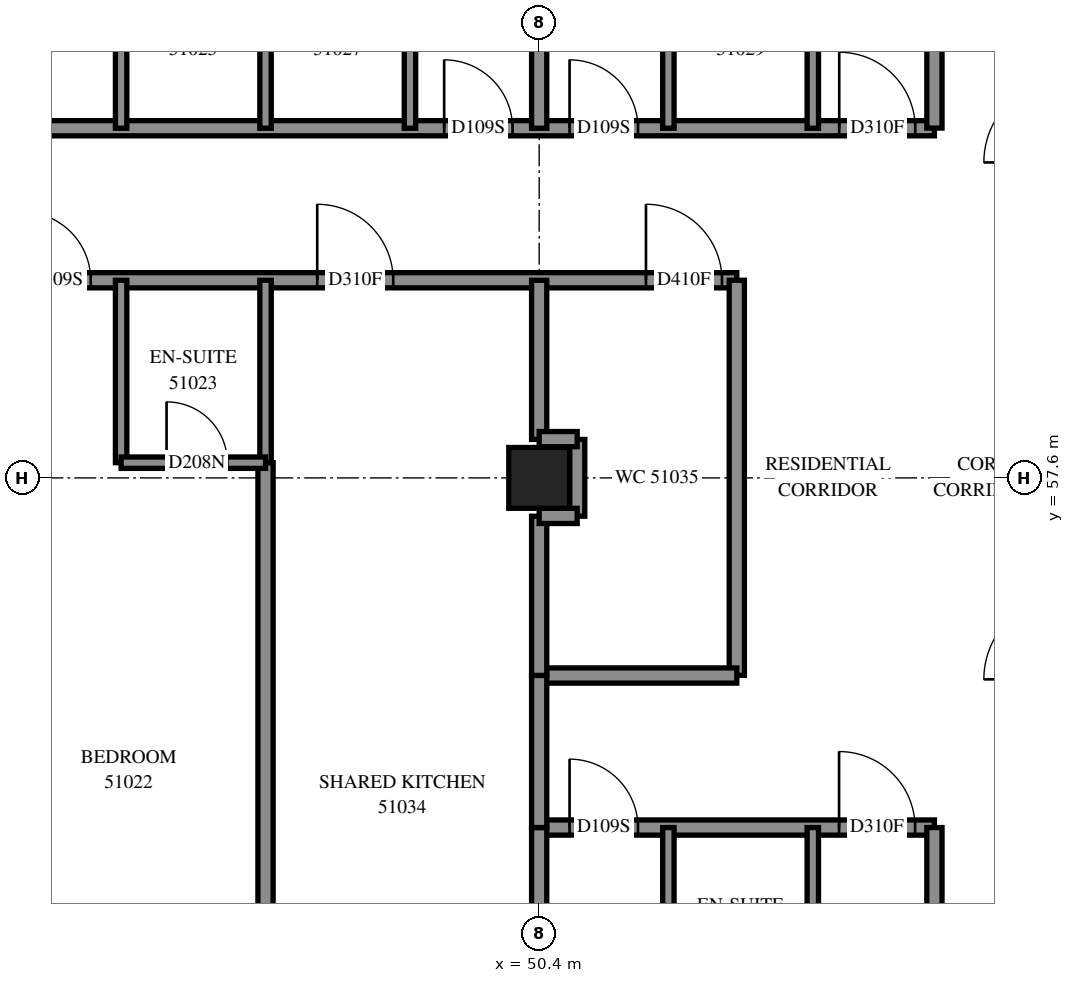
"""IFC4 building model, lengths in metres.
Left out: names, types, materials, properties, quantities, classifications, styles, units other than length and angle.
Written with IfcOpenShell. Run it as: python <this file> out.ifc"""

import sys

from ifc_helpers import new_model, si_unit, direction, frame, frame_2d, origin, origin_2d, place, context, subcontext, project, spatial, rectangle, extrude, element, fill, save


model = new_model("IFC4")
c1 = context("Model", 3, precision=1e-05, world=origin(), true_north=direction((0.0, 1.0)))
c2 = subcontext(c1, "Body", "Model", "MODEL_VIEW")
j1 = project(units=[si_unit("LENGTHUNIT", "METRE"), si_unit("PLANEANGLEUNIT", "RADIAN")], contexts=[c1])
p1 = place(None, origin())
s1 = spatial("IfcSite", under=j1, at=p1, CompositionType="ELEMENT")
p2 = place(p1, origin())
s2 = spatial("IfcBuilding", under=s1, at=p2, CompositionType="ELEMENT")
p3 = place(p2, frame((0.0, 0.0, 189.6)))
s3 = spatial("IfcBuildingStorey", under=s2, at=p3, CompositionType="ELEMENT", Elevation=189.6)
p4 = place(p3, frame((50.4, 57.6, 0.0), z_axis=(0.0, 0.0, 1.0), x_axis=(1.0, 0.0, 0.0)))
e1 = element("IfcColumn", 1, at=p4, inside=s3, PredefinedType="COLUMN", context=c2, shape_type="SweptSolid", body=[
    extrude(rectangle(XDim=0.8, YDim=0.8, at=origin_2d()), origin(), (0.0, 0.0, 1.0), 3.1),
])
p5 = place(p3, frame((36.0, 60.2, 0.0), z_axis=(0.0, 0.0, 1.0), x_axis=(1.0, 0.0, 0.0)))
e2 = element("IfcWall", 2, at=p5, inside=s3, PredefinedType="PARTITIONING", context=c2, shape_type="SweptSolid", body=[
    extrude(rectangle(XDim=17.0, YDim=0.2, at=frame_2d((8.5, 0.0))), origin(), (0.0, 0.0, 1.0), 3.1),
])
p6 = place(p5, frame((4.125, 0.0, 0.0)))
e3 = element("IfcOpeningElement", 3, at=p6, cuts=e2, PredefinedType="OPENING", context=c2, shape_type="SweptSolid", body=[
    extrude(rectangle(XDim=1.0, YDim=2.1, at=frame_2d((0.5, 1.05))), frame((0.0, 0.11, 0.0), z_axis=(0.0, -1.0, 0.0), x_axis=(1.0, 0.0, 0.0)), (0.0, 0.0, 1.0), 0.22),
])
p7 = place(p5, frame((7.6, 0.0, 0.0)))
e4 = element("IfcOpeningElement", 4, at=p7, cuts=e2, PredefinedType="OPENING", context=c2, shape_type="SweptSolid", body=[
    extrude(rectangle(XDim=0.9, YDim=2.1, at=frame_2d((0.45, 1.05))), frame((0.0, 0.11, 0.0), z_axis=(0.0, -1.0, 0.0), x_axis=(1.0, 0.0, 0.0)), (0.0, 0.0, 1.0), 0.22),
])
p8 = place(p5, frame((11.48, 0.0, 0.0)))
e5 = element("IfcOpeningElement", 5, at=p8, cuts=e2, PredefinedType="OPENING", context=c2, shape_type="SweptSolid", body=[
    extrude(rectangle(XDim=1.0, YDim=2.1, at=frame_2d((0.5, 1.05))), frame((0.0, 0.11, 0.0), z_axis=(0.0, -1.0, 0.0), x_axis=(1.0, 0.0, 0.0)), (0.0, 0.0, 1.0), 0.22),
])
p9 = place(p5, frame((15.805, 0.0, 0.0)))
e6 = element("IfcOpeningElement", 6, at=p9, cuts=e2, PredefinedType="OPENING", context=c2, shape_type="SweptSolid", body=[
    extrude(rectangle(XDim=1.0, YDim=2.1, at=frame_2d((0.5, 1.05))), frame((0.0, 0.11, 0.0), z_axis=(0.0, -1.0, 0.0), x_axis=(1.0, 0.0, 0.0)), (0.0, 0.0, 1.0), 0.22),
])
p10 = place(p3, frame((40.602, 62.2, 0.0), z_axis=(0.0, 0.0, 1.0), x_axis=(1.0, 0.0, 0.0)))
e7 = element("IfcWall", 7, at=p10, inside=s3, PredefinedType="PARTITIONING", context=c2, shape_type="SweptSolid", body=[
    extrude(rectangle(XDim=14.998, YDim=0.2, at=frame_2d((7.499, 0.0))), origin(), (0.0, 0.0, 1.0), 3.1),
])
p11 = place(p10, frame((1.306, 0.0, 0.0)))
e8 = element("IfcOpeningElement", 8, at=p11, cuts=e7, PredefinedType="OPENING", context=c2, shape_type="SweptSolid", body=[
    extrude(rectangle(XDim=0.9, YDim=2.1, at=frame_2d((0.45, 1.05))), frame((0.0, 0.11, 0.0), z_axis=(0.0, -1.0, 0.0), x_axis=(1.0, 0.0, 0.0)), (0.0, 0.0, 1.0), 0.22),
])
p12 = place(p10, frame((8.548, 0.0, 0.0)))
e9 = element("IfcOpeningElement", 9, at=p12, cuts=e7, PredefinedType="OPENING", context=c2, shape_type="SweptSolid", body=[
    extrude(rectangle(XDim=0.9, YDim=2.1, at=frame_2d((0.45, 1.05))), frame((0.0, 0.11, 0.0), z_axis=(0.0, -1.0, 0.0), x_axis=(1.0, 0.0, 0.0)), (0.0, 0.0, 1.0), 0.22),
])
p13 = place(p10, frame((10.198, 0.0, 0.0)))
e10 = element("IfcOpeningElement", 10, at=p13, cuts=e7, PredefinedType="OPENING", context=c2, shape_type="SweptSolid", body=[
    extrude(rectangle(XDim=0.9, YDim=2.1, at=frame_2d((0.45, 1.05))), frame((0.0, 0.11, 0.0), z_axis=(0.0, -1.0, 0.0), x_axis=(1.0, 0.0, 0.0)), (0.0, 0.0, 1.0), 0.22),
])
p14 = place(p10, frame((13.746, 0.0, 0.0)))
e11 = element("IfcOpeningElement", 11, at=p14, cuts=e7, PredefinedType="OPENING", context=c2, shape_type="SweptSolid", body=[
    extrude(rectangle(XDim=1.0, YDim=2.1, at=frame_2d((0.5, 1.05))), frame((0.0, 0.11, 0.0), z_axis=(0.0, -1.0, 0.0), x_axis=(1.0, 0.0, 0.0)), (0.0, 0.0, 1.0), 0.22),
])
p15 = place(p3, frame((46.8, 49.7, 0.0), z_axis=(0.0, 0.0, 1.0), x_axis=(0.0, 1.0, 0.0)))
e12 = element("IfcWall", 12, at=p15, inside=s3, PredefinedType="PARTITIONING", context=c2, shape_type="SweptSolid", body=[
    extrude(rectangle(XDim=8.1, YDim=0.2, at=frame_2d((4.05, 0.0))), origin(), (0.0, 0.0, 1.0), 3.1),
])
p16 = place(p3, frame((50.4, 53.0, 0.0), z_axis=(0.0, 0.0, 1.0), x_axis=(1.0, 0.0, 0.0)))
e13 = element("IfcWall", 13, at=p16, inside=s3, PredefinedType="PARTITIONING", context=c2, shape_type="SweptSolid", body=[
    extrude(rectangle(XDim=5.2, YDim=0.2, at=frame_2d((2.6, 0.0))), origin(), (0.0, 0.0, 1.0), 3.1),
])
p17 = place(p16, frame((0.4, 0.0, 0.0)))
e14 = element("IfcOpeningElement", 14, at=p17, cuts=e13, PredefinedType="OPENING", context=c2, shape_type="SweptSolid", body=[
    extrude(rectangle(XDim=0.9, YDim=2.1, at=frame_2d((0.45, 1.05))), frame((0.0, 0.11, 0.0), z_axis=(0.0, -1.0, 0.0), x_axis=(1.0, 0.0, 0.0)), (0.0, 0.0, 1.0), 0.22),
])
p18 = place(p16, frame((3.946, 0.0, 0.0)))
e15 = element("IfcOpeningElement", 15, at=p18, cuts=e13, PredefinedType="OPENING", context=c2, shape_type="SweptSolid", body=[
    extrude(rectangle(XDim=1.0, YDim=2.1, at=frame_2d((0.5, 1.05))), frame((0.0, 0.11, 0.0), z_axis=(0.0, -1.0, 0.0), x_axis=(1.0, 0.0, 0.0)), (0.0, 0.0, 1.0), 0.22),
])
p19 = place(p3, frame((53.0, 55.002, 0.0), z_axis=(0.0, 0.0, 1.0), x_axis=(0.0, 1.0, 0.0)))
e16 = element("IfcWall", 16, at=p19, inside=s3, PredefinedType="PARTITIONING", context=c2, shape_type="SweptSolid", body=[
    extrude(rectangle(XDim=5.198, YDim=0.2, at=frame_2d((2.599, 0.0))), origin(), (0.0, 0.0, 1.0), 3.1),
])
p20 = place(p3, frame((55.6, 48.4, 0.0), z_axis=(0.0, 0.0, 1.0), x_axis=(0.0, 1.0, 0.0)))
e17 = element("IfcWall", 17, at=p20, inside=s3, PredefinedType="PARTITIONING", context=c2, shape_type="SweptSolid", body=[
    extrude(rectangle(XDim=4.6, YDim=0.2, at=frame_2d((2.3, 0.0))), origin(), (0.0, 0.0, 1.0), 3.1),
])
p21 = place(p3, frame((55.6, 62.202, 0.0), z_axis=(0.0, 0.0, 1.0), x_axis=(0.0, 1.0, 0.0)))
e18 = element("IfcWall", 18, at=p21, inside=s3, PredefinedType="PARTITIONING", context=c2, shape_type="SweptSolid", body=[
    extrude(rectangle(XDim=4.598, YDim=0.2, at=frame_2d((2.299, 0.0))), origin(), (0.0, 0.0, 1.0), 3.1),
])
p22 = place(p3, frame((50.4, 55.0, 0.0), z_axis=(0.0, 0.0, 1.0), x_axis=(1.0, 0.0, 0.0)))
e19 = element("IfcWall", 19, at=p22, inside=s3, PredefinedType="PARTITIONING", context=c2, shape_type="SweptSolid", body=[
    extrude(rectangle(XDim=2.6, YDim=0.2, at=frame_2d((1.3, 0.0))), origin(), (0.0, 0.0, 1.0), 3.1),
])
for number, where, z_axis, x_axis in (
    (20, (44.9, 57.8, 0.0), (0.0, 0.0, 1.0), (0.0, 1.0, 0.0)),
    (21, (46.8, 57.8, 0.0), (0.0, 0.0, 1.0), (0.0, 1.0, 0.0)),
    (22, (52.1, 50.6, 0.0), (0.0, 0.0, 1.0), (0.0, 1.0, 0.0)),
    (23, (54.0, 50.6, 0.0), (0.0, 0.0, 1.0), (0.0, 1.0, 0.0)),
    (24, (44.9, 62.2, 0.0), (0.0, 0.0, 1.0), (0.0, 1.0, 0.0)),
    (25, (46.8, 62.2, 0.0), (0.0, 0.0, 1.0), (0.0, 1.0, 0.0)),
    (26, (48.7, 62.2, 0.0), (0.0, 0.0, 1.0), (0.0, 1.0, 0.0)),
    (27, (52.1, 62.2, 0.0), (0.0, 0.0, 1.0), (0.0, 1.0, 0.0)),
    (28, (54.0, 62.2, 0.0), (0.0, 0.0, 1.0), (0.0, 1.0, 0.0)),
):
    element("IfcWall", number, at=place(p3, frame(where, z_axis=z_axis, x_axis=x_axis)), inside=s3, PredefinedType="PARTITIONING", context=c2, shape_type="SweptSolid", body=[
        extrude(rectangle(XDim=2.4, YDim=0.15, at=frame_2d((1.2, 0.0))), origin(), (0.0, 0.0, 1.0), 3.1),
    ])
for number, where, z_axis, x_axis in (
    (29, (50.4, 50.8, 0.0), (0.0, 0.0, 1.0), (0.0, 1.0, 0.0)),
    (30, (50.4, 62.2, 0.0), (0.0, 0.0, 1.0), (0.0, 1.0, 0.0)),
):
    element("IfcWall", number, at=place(p3, frame(where, z_axis=z_axis, x_axis=x_axis)), inside=s3, PredefinedType="PARTITIONING", context=c2, shape_type="SweptSolid", body=[
        extrude(rectangle(XDim=2.2, YDim=0.2, at=frame_2d((1.1, 0.0))), origin(), (0.0, 0.0, 1.0), 3.1),
    ])
p23 = place(p3, frame((50.4, 55.0, 0.0), z_axis=(0.0, 0.0, 1.0), x_axis=(0.0, 1.0, 0.0)))
e31 = element("IfcWall", 31, at=p23, inside=s3, PredefinedType="PARTITIONING", context=c2, shape_type="SweptSolid", body=[
    extrude(rectangle(XDim=2.096, YDim=0.2, at=frame_2d((1.048, 0.0))), origin(), (0.0, 0.0, 1.0), 3.1),
])
p24 = place(p3, frame((50.4, 58.106, 0.0), z_axis=(0.0, 0.0, 1.0), x_axis=(0.0, 1.0, 0.0)))
e32 = element("IfcWall", 32, at=p24, inside=s3, PredefinedType="PARTITIONING", context=c2, shape_type="SweptSolid", body=[
    extrude(rectangle(XDim=2.094, YDim=0.2, at=frame_2d((1.047, 0.0))), origin(), (0.0, 0.0, 1.0), 3.1),
])
p25 = place(p3, frame((50.4, 53.0, 0.0), z_axis=(0.0, 0.0, 1.0), x_axis=(0.0, 1.0, 0.0)))
e33 = element("IfcWall", 33, at=p25, inside=s3, PredefinedType="PARTITIONING", context=c2, shape_type="SweptSolid", body=[
    extrude(rectangle(XDim=2.0, YDim=0.2, at=frame_2d((1.0, 0.0))), origin(), (0.0, 0.0, 1.0), 3.1),
])
p26 = place(p3, frame((44.9, 57.8, 0.0), z_axis=(0.0, 0.0, 1.0), x_axis=(1.0, 0.0, 0.0)))
e34 = element("IfcWall", 34, at=p26, inside=s3, PredefinedType="PARTITIONING", context=c2, shape_type="SweptSolid", body=[
    extrude(rectangle(XDim=1.9, YDim=0.15, at=frame_2d((0.95, 0.0))), origin(), (0.0, 0.0, 1.0), 3.1),
])
p27 = place(p26, frame((0.598, 0.0, 0.0)))
e35 = element("IfcOpeningElement", 35, at=p27, cuts=e34, PredefinedType="OPENING", context=c2, shape_type="SweptSolid", body=[
    extrude(rectangle(XDim=0.8, YDim=2.1, at=frame_2d((0.4, 1.05))), frame((0.0, 0.085, 0.0), z_axis=(0.0, -1.0, 0.0), x_axis=(1.0, 0.0, 0.0)), (0.0, 0.0, 1.0), 0.17),
])
p28 = place(p3, frame((50.9, 57.096, 0.0), z_axis=(0.0, 0.0, 1.0), x_axis=(0.0, 1.0, 0.0)))
e36 = element("IfcWall", 36, at=p28, inside=s3, PredefinedType="PARTITIONING", context=c2, shape_type="SweptSolid", body=[
    extrude(rectangle(XDim=1.01, YDim=0.2, at=frame_2d((0.505, 0.0))), origin(), (0.0, 0.0, 1.0), 3.1),
])
for number, where, z_axis, x_axis in (
    (37, (50.4, 58.11, 0.0), (0.0, 0.0, 1.0), (1.0, 0.0, 0.0)),
    (38, (50.4, 57.1, 0.0), (0.0, 0.0, 1.0), (1.0, 0.0, 0.0)),
):
    element("IfcWall", number, at=place(p3, frame(where, z_axis=z_axis, x_axis=x_axis)), inside=s3, PredefinedType="PARTITIONING", context=c2, shape_type="SweptSolid", body=[
        extrude(rectangle(XDim=0.5, YDim=0.2, at=frame_2d((0.25, 0.0))), origin(), (0.0, 0.0, 1.0), 3.1),
    ])
p29 = place(p7, origin())
e39 = element("IfcDoor", 39, at=p29, inside=s3, OperationType="SINGLE_SWING_LEFT", PredefinedType="DOOR", context=c2, shape_type="SweptSolid", body=[
    extrude(rectangle(XDim=0.9, YDim=2.1, at=frame_2d((0.45, 1.05))), frame((0.0, 0.025, 0.0), z_axis=(0.0, -1.0, 0.0), x_axis=(1.0, 0.0, 0.0)), (0.0, 0.0, 1.0), 0.05),
])
fill(e4, e39)
p30 = place(p27, origin())
e40 = element("IfcDoor", 40, at=p30, inside=s3, OperationType="SINGLE_SWING_RIGHT", PredefinedType="DOOR", context=c2, shape_type="SweptSolid", body=[
    extrude(rectangle(XDim=0.8, YDim=2.1, at=frame_2d((0.4, 1.05))), frame((0.0, 0.025, 0.0), z_axis=(0.0, -1.0, 0.0), x_axis=(1.0, 0.0, 0.0)), (0.0, 0.0, 1.0), 0.05),
])
fill(e35, e40)
p31 = place(p12, origin())
e41 = element("IfcDoor", 41, at=p31, inside=s3, OperationType="SINGLE_SWING_LEFT", PredefinedType="DOOR", context=c2, shape_type="SweptSolid", body=[
    extrude(rectangle(XDim=0.9, YDim=2.1, at=frame_2d((0.45, 1.05))), frame((0.0, 0.025, 0.0), z_axis=(0.0, -1.0, 0.0), x_axis=(1.0, 0.0, 0.0)), (0.0, 0.0, 1.0), 0.05),
])
fill(e9, e41)
p32 = place(p13, origin())
e42 = element("IfcDoor", 42, at=p32, inside=s3, OperationType="SINGLE_SWING_RIGHT", PredefinedType="DOOR", context=c2, shape_type="SweptSolid", body=[
    extrude(rectangle(XDim=0.9, YDim=2.1, at=frame_2d((0.45, 1.05))), frame((0.0, 0.025, 0.0), z_axis=(0.0, -1.0, 0.0), x_axis=(1.0, 0.0, 0.0)), (0.0, 0.0, 1.0), 0.05),
])
fill(e10, e42)
p33 = place(p14, origin())
e43 = element("IfcDoor", 43, at=p33, inside=s3, OperationType="SINGLE_SWING_LEFT", PredefinedType="DOOR", context=c2, shape_type="SweptSolid", body=[
    extrude(rectangle(XDim=1.0, YDim=2.1, at=frame_2d((0.5, 1.05))), frame((0.0, 0.025, 0.0), z_axis=(0.0, -1.0, 0.0), x_axis=(1.0, 0.0, 0.0)), (0.0, 0.0, 1.0), 0.05),
])
fill(e11, e43)
p34 = place(p8, origin())
e44 = element("IfcDoor", 44, at=p34, inside=s3, OperationType="SINGLE_SWING_RIGHT", PredefinedType="DOOR", context=c2, shape_type="SweptSolid", body=[
    extrude(rectangle(XDim=1.0, YDim=2.1, at=frame_2d((0.5, 1.05))), frame((0.0, 0.025, 0.0), z_axis=(0.0, -1.0, 0.0), x_axis=(1.0, 0.0, 0.0)), (0.0, 0.0, 1.0), 0.05),
])
fill(e5, e44)
p35 = place(p9, origin())
e45 = element("IfcDoor", 45, at=p35, inside=s3, OperationType="SINGLE_SWING_LEFT", PredefinedType="DOOR", context=c2, shape_type="SweptSolid", body=[
    extrude(rectangle(XDim=1.0, YDim=2.1, at=frame_2d((0.5, 1.05))), frame((0.0, 0.025, 0.0), z_axis=(0.0, -1.0, 0.0), x_axis=(1.0, 0.0, 0.0)), (0.0, 0.0, 1.0), 0.05),
])
fill(e6, e45)
p36 = place(p17, origin())
e46 = element("IfcDoor", 46, at=p36, inside=s3, OperationType="SINGLE_SWING_LEFT", PredefinedType="DOOR", context=c2, shape_type="SweptSolid", body=[
    extrude(rectangle(XDim=0.9, YDim=2.1, at=frame_2d((0.45, 1.05))), frame((0.0, 0.025, 0.0), z_axis=(0.0, -1.0, 0.0), x_axis=(1.0, 0.0, 0.0)), (0.0, 0.0, 1.0), 0.05),
])
fill(e14, e46)
p37 = place(p18, origin())
e47 = element("IfcDoor", 47, at=p37, inside=s3, OperationType="SINGLE_SWING_RIGHT", PredefinedType="DOOR", context=c2, shape_type="SweptSolid", body=[
    extrude(rectangle(XDim=1.0, YDim=2.1, at=frame_2d((0.5, 1.05))), frame((0.0, 0.025, 0.0), z_axis=(0.0, -1.0, 0.0), x_axis=(1.0, 0.0, 0.0)), (0.0, 0.0, 1.0), 0.05),
])
fill(e15, e47)
save(model, sys.argv[1])
